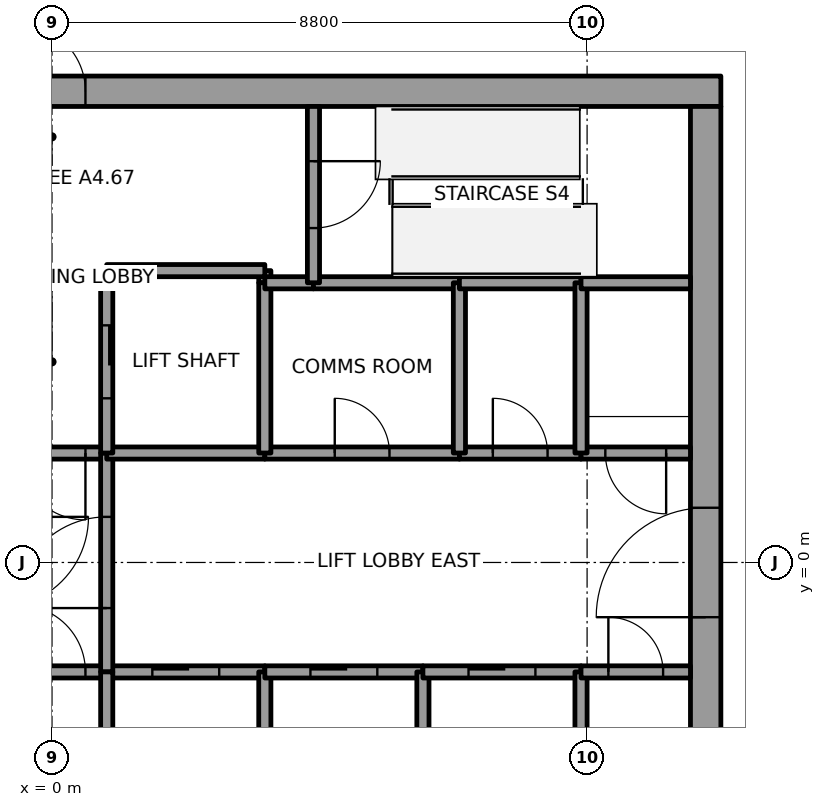
"""IFC4 building model, lengths in metres.
Left out: names, types, materials, properties, quantities, classifications, styles, units other than length and angle.
Written with IfcOpenShell. Run it as: python <this file> out.ifc"""

import sys

from ifc_helpers import new_model, si_unit, direction, frame, frame_2d, origin, place, context, subcontext, project, spatial, rectangle, extrude, element, fill, save


model = new_model("IFC4")
c1 = context("Model", 3, precision=1e-05, world=origin(), true_north=direction((0.0, 1.0)))
c2 = subcontext(c1, "Body", "Model", "MODEL_VIEW")
j1 = project(units=[si_unit("LENGTHUNIT", "METRE"), si_unit("PLANEANGLEUNIT", "RADIAN")], contexts=[c1])
p1 = place(None, origin())
s1 = spatial("IfcSite", under=j1, at=p1, CompositionType="ELEMENT")
p2 = place(p1, origin())
s2 = spatial("IfcBuilding", under=s1, at=p2, CompositionType="ELEMENT")
p3 = place(p2, frame((0.0, 0.0, 287.0)))
s3 = spatial("IfcBuildingStorey", under=s2, at=p3, CompositionType="ELEMENT", Elevation=287.0)
p4 = place(p3, frame((-11.0, 7.75, 0.0), z_axis=(0.0, 0.0, 1.0), x_axis=(1.0, 0.0, 0.0)))
e1 = element("IfcWall", 1, at=p4, inside=s3, PredefinedType="SHEAR", context=c2, shape_type="SweptSolid", body=[
    extrude(rectangle(XDim=22.0, YDim=0.5, at=frame_2d((11.0, 0.0))), origin(), (0.0, 0.0, 1.0), 4.0),
])
p5 = place(p4, frame((10.45, 0.0, 0.0)))
e2 = element("IfcOpeningElement", 2, at=p5, cuts=e1, PredefinedType="OPENING", context=c2, shape_type="SweptSolid", body=[
    extrude(rectangle(XDim=1.1, YDim=2.1, at=frame_2d((0.55, 1.05))), frame((0.0, 0.25, 0.0), z_axis=(0.0, -1.0, 0.0), x_axis=(1.0, 0.0, 0.0)), (0.0, 0.0, 1.0), 0.5),
])
p6 = place(p3, frame((10.75, -7.5, 0.0), z_axis=(0.0, 0.0, 1.0), x_axis=(0.0, 1.0, 0.0)))
e3 = element("IfcWall", 3, at=p6, inside=s3, PredefinedType="SHEAR", context=c2, shape_type="SweptSolid", body=[
    extrude(rectangle(XDim=15.0, YDim=0.5, at=frame_2d((7.5, 0.0))), origin(), (0.0, 0.0, 1.0), 4.0),
])
p7 = place(p6, frame((6.6, 0.0, 0.0)))
e4 = element("IfcOpeningElement", 4, at=p7, cuts=e3, PredefinedType="OPENING", context=c2, shape_type="SweptSolid", body=[
    extrude(rectangle(XDim=1.8, YDim=2.1, at=frame_2d((0.9, 1.05))), frame((0.0, 0.25, 0.0), z_axis=(0.0, -1.0, 0.0), x_axis=(1.0, 0.0, 0.0)), (0.0, 0.0, 1.0), 0.5),
])
p8 = place(p3, frame((-0.9, -1.8, 0.0), z_axis=(0.0, 0.0, 1.0), x_axis=(1.0, 0.0, 0.0)))
e5 = element("IfcWall", 5, at=p8, inside=s3, PredefinedType="SOLIDWALL", context=c2, shape_type="SweptSolid", body=[
    extrude(rectangle(XDim=1.8, YDim=0.2, at=frame_2d((0.9, 0.0))), origin(), (0.0, 0.0, 1.0), 3.85),
])
p9 = place(p8, frame((0.35, 0.0, 0.0)))
e6 = element("IfcOpeningElement", 6, at=p9, cuts=e5, PredefinedType="OPENING", context=c2, shape_type="SweptSolid", body=[
    extrude(rectangle(XDim=1.1, YDim=2.1, at=frame_2d((0.55, 1.05))), frame((0.0, 0.1, 0.0), z_axis=(0.0, -1.0, 0.0), x_axis=(1.0, 0.0, 0.0)), (0.0, 0.0, 1.0), 0.2),
])
p10 = place(p3, frame((0.9, 1.8, 0.0), z_axis=(0.0, 0.0, 1.0), x_axis=(-1.0, 0.0, 0.0)))
e7 = element("IfcWall", 7, at=p10, inside=s3, PredefinedType="SOLIDWALL", context=c2, shape_type="SweptSolid", body=[
    extrude(rectangle(XDim=1.8, YDim=0.2, at=frame_2d((0.9, 0.0))), origin(), (0.0, 0.0, 1.0), 3.85),
])
p11 = place(p10, frame((0.35, 0.0, 0.0)))
e8 = element("IfcOpeningElement", 8, at=p11, cuts=e7, PredefinedType="OPENING", context=c2, shape_type="SweptSolid", body=[
    extrude(rectangle(XDim=1.1, YDim=2.1, at=frame_2d((0.55, 1.05))), frame((0.0, 0.1, 0.0), z_axis=(0.0, -1.0, 0.0), x_axis=(1.0, 0.0, 0.0)), (0.0, 0.0, 1.0), 0.2),
])
p12 = place(p3, frame((0.9, -1.8, 0.0), z_axis=(0.0, 0.0, 1.0), x_axis=(1.0, 0.0, 0.0)))
e9 = element("IfcWall", 9, at=p12, inside=s3, PredefinedType="SOLIDWALL", context=c2, shape_type="SweptSolid", body=[
    extrude(rectangle(XDim=2.6, YDim=0.2, at=frame_2d((1.3, 0.0))), origin(), (0.0, 0.0, 1.0), 3.85),
])
p13 = place(p12, frame((0.75, 0.0, 0.0)))
e10 = element("IfcOpeningElement", 10, at=p13, cuts=e9, PredefinedType="OPENING", context=c2, shape_type="SweptSolid", body=[
    extrude(rectangle(XDim=1.1, YDim=2.1, at=frame_2d((0.55, 1.05))), frame((0.0, 0.1, 0.0), z_axis=(0.0, -1.0, 0.0), x_axis=(1.0, 0.0, 0.0)), (0.0, 0.0, 1.0), 0.2),
])
p14 = place(p3, frame((0.9, -1.8, 0.0), z_axis=(0.0, 0.0, 1.0), x_axis=(0.0, 1.0, 0.0)))
e11 = element("IfcWall", 11, at=p14, inside=s3, PredefinedType="SOLIDWALL", context=c2, shape_type="SweptSolid", body=[
    extrude(rectangle(XDim=3.6, YDim=0.2, at=frame_2d((1.8, 0.0))), origin(), (0.0, 0.0, 1.0), 3.85),
])
p15 = place(p14, frame((1.05, 0.0, 0.0)))
e12 = element("IfcOpeningElement", 12, at=p15, cuts=e11, PredefinedType="OPENING", context=c2, shape_type="SweptSolid", body=[
    extrude(rectangle(XDim=1.5, YDim=2.1, at=frame_2d((0.75, 1.05))), frame((0.0, 0.1, 0.0), z_axis=(0.0, -1.0, 0.0), x_axis=(1.0, 0.0, 0.0)), (0.0, 0.0, 1.0), 0.2),
])
p16 = place(p3, frame((0.9, -1.8, 0.0), z_axis=(0.0, 0.0, 1.0), x_axis=(0.0, -1.0, 0.0)))
e13 = element("IfcWall", 13, at=p16, inside=s3, PredefinedType="SOLIDWALL", context=c2, shape_type="SweptSolid", body=[
    extrude(rectangle(XDim=2.8, YDim=0.2, at=frame_2d((1.4, 0.0))), origin(), (0.0, 0.0, 1.0), 3.85),
])
p17 = place(p3, frame((3.5, 1.8, 0.0), z_axis=(0.0, 0.0, 1.0), x_axis=(-1.0, 0.0, 0.0)))
e14 = element("IfcWall", 14, at=p17, inside=s3, PredefinedType="SOLIDWALL", context=c2, shape_type="SweptSolid", body=[
    extrude(rectangle(XDim=2.6, YDim=0.2, at=frame_2d((1.3, 0.0))), origin(), (0.0, 0.0, 1.0), 3.85),
])
p18 = place(p3, frame((3.5, 4.6, 0.0), z_axis=(0.0, 0.0, 1.0), x_axis=(0.0, 1.0, 0.0)))
e15 = element("IfcWall", 15, at=p18, inside=s3, PredefinedType="SOLIDWALL", context=c2, shape_type="SweptSolid", body=[
    extrude(rectangle(XDim=0.2, YDim=0.2, at=frame_2d((0.1, 0.0))), origin(), (0.0, 0.0, 1.0), 3.85),
])
p19 = place(p3, frame((3.5, 4.8, 0.0), z_axis=(0.0, 0.0, 1.0), x_axis=(-1.0, 0.0, 0.0)))
e16 = element("IfcWall", 16, at=p19, inside=s3, PredefinedType="SOLIDWALL", context=c2, shape_type="SweptSolid", body=[
    extrude(rectangle(XDim=2.6, YDim=0.2, at=frame_2d((1.3, 0.0))), origin(), (0.0, 0.0, 1.0), 3.85),
])
p20 = place(p3, frame((0.9, 4.8, 0.0), z_axis=(0.0, 0.0, 1.0), x_axis=(0.0, -1.0, 0.0)))
e17 = element("IfcWall", 17, at=p20, inside=s3, PredefinedType="SOLIDWALL", context=c2, shape_type="SweptSolid", body=[
    extrude(rectangle(XDim=3.0, YDim=0.2, at=frame_2d((1.5, 0.0))), origin(), (0.0, 0.0, 1.0), 3.85),
])
p21 = place(p20, frame((0.9, 0.0, 0.0)))
e18 = element("IfcOpeningElement", 18, at=p21, cuts=e17, PredefinedType="OPENING", context=c2, shape_type="SweptSolid", body=[
    extrude(rectangle(XDim=1.2, YDim=2.1, at=frame_2d((0.6, 1.05))), frame((0.0, 0.1, 0.0), z_axis=(0.0, -1.0, 0.0), x_axis=(1.0, 0.0, 0.0)), (0.0, 0.0, 1.0), 0.2),
])
p22 = place(p3, frame((3.5, -4.6, 0.0), z_axis=(0.0, 0.0, 1.0), x_axis=(0.0, 1.0, 0.0)))
e19 = element("IfcWall", 19, at=p22, inside=s3, PredefinedType="SOLIDWALL", context=c2, shape_type="SweptSolid", body=[
    extrude(rectangle(XDim=2.8, YDim=0.2, at=frame_2d((1.4, 0.0))), origin(), (0.0, 0.0, 1.0), 3.85),
])
p23 = place(p3, frame((3.5, -1.8, 0.0), z_axis=(0.0, 0.0, 1.0), x_axis=(1.0, 0.0, 0.0)))
e20 = element("IfcWall", 20, at=p23, inside=s3, PredefinedType="SOLIDWALL", context=c2, shape_type="SweptSolid", body=[
    extrude(rectangle(XDim=2.6, YDim=0.2, at=frame_2d((1.3, 0.0))), origin(), (0.0, 0.0, 1.0), 3.85),
])
p24 = place(p23, frame((0.75, 0.0, 0.0)))
e21 = element("IfcOpeningElement", 21, at=p24, cuts=e20, PredefinedType="OPENING", context=c2, shape_type="SweptSolid", body=[
    extrude(rectangle(XDim=1.1, YDim=2.1, at=frame_2d((0.55, 1.05))), frame((0.0, 0.1, 0.0), z_axis=(0.0, -1.0, 0.0), x_axis=(1.0, 0.0, 0.0)), (0.0, 0.0, 1.0), 0.2),
])
p25 = place(p3, frame((3.5, 1.8, 0.0), z_axis=(0.0, 0.0, 1.0), x_axis=(1.0, 0.0, 0.0)))
e22 = element("IfcWall", 22, at=p25, inside=s3, PredefinedType="SOLIDWALL", context=c2, shape_type="SweptSolid", body=[
    extrude(rectangle(XDim=3.2, YDim=0.2, at=frame_2d((1.6, 0.0))), origin(), (0.0, 0.0, 1.0), 3.85),
])
p26 = place(p25, frame((1.15, 0.0, 0.0)))
e23 = element("IfcOpeningElement", 23, at=p26, cuts=e22, PredefinedType="OPENING", context=c2, shape_type="SweptSolid", body=[
    extrude(rectangle(XDim=0.9, YDim=2.1, at=frame_2d((0.45, 1.05))), frame((0.0, 0.1, 0.0), z_axis=(0.0, -1.0, 0.0), x_axis=(1.0, 0.0, 0.0)), (0.0, 0.0, 1.0), 0.2),
])
p27 = place(p3, frame((3.5, 4.6, 0.0), z_axis=(0.0, 0.0, 1.0), x_axis=(0.0, -1.0, 0.0)))
e24 = element("IfcWall", 24, at=p27, inside=s3, PredefinedType="SOLIDWALL", context=c2, shape_type="SweptSolid", body=[
    extrude(rectangle(XDim=2.8, YDim=0.2, at=frame_2d((1.4, 0.0))), origin(), (0.0, 0.0, 1.0), 3.85),
])
p28 = place(p3, frame((4.3, 4.6, 0.0), z_axis=(0.0, 0.0, 1.0), x_axis=(-1.0, 0.0, 0.0)))
e25 = element("IfcWall", 25, at=p28, inside=s3, PredefinedType="SOLIDWALL", context=c2, shape_type="SweptSolid", body=[
    extrude(rectangle(XDim=0.8, YDim=0.2, at=frame_2d((0.4, 0.0))), origin(), (0.0, 0.0, 1.0), 3.85),
])
p29 = place(p3, frame((6.7, 4.6, 0.0), z_axis=(0.0, 0.0, 1.0), x_axis=(-1.0, 0.0, 0.0)))
e26 = element("IfcWall", 26, at=p29, inside=s3, PredefinedType="SOLIDWALL", context=c2, shape_type="SweptSolid", body=[
    extrude(rectangle(XDim=2.4, YDim=0.2, at=frame_2d((1.2, 0.0))), origin(), (0.0, 0.0, 1.0), 3.85),
])
p30 = place(p3, frame((4.3, 7.5, 0.0), z_axis=(0.0, 0.0, 1.0), x_axis=(0.0, -1.0, 0.0)))
e27 = element("IfcWall", 27, at=p30, inside=s3, PredefinedType="SOLIDWALL", context=c2, shape_type="SweptSolid", body=[
    extrude(rectangle(XDim=2.9, YDim=0.2, at=frame_2d((1.45, 0.0))), origin(), (0.0, 0.0, 1.0), 3.85),
])
p31 = place(p30, frame((0.9, 0.0, 0.0)))
e28 = element("IfcOpeningElement", 28, at=p31, cuts=e27, PredefinedType="OPENING", context=c2, shape_type="SweptSolid", body=[
    extrude(rectangle(XDim=1.1, YDim=2.1, at=frame_2d((0.55, 1.05))), frame((0.0, 0.1, 0.0), z_axis=(0.0, -1.0, 0.0), x_axis=(1.0, 0.0, 0.0)), (0.0, 0.0, 1.0), 0.2),
])
p32 = place(p3, frame((6.1, -4.6, 0.0), z_axis=(0.0, 0.0, 1.0), x_axis=(0.0, 1.0, 0.0)))
e29 = element("IfcWall", 29, at=p32, inside=s3, PredefinedType="SOLIDWALL", context=c2, shape_type="SweptSolid", body=[
    extrude(rectangle(XDim=2.8, YDim=0.2, at=frame_2d((1.4, 0.0))), origin(), (0.0, 0.0, 1.0), 3.85),
])
p33 = place(p3, frame((6.1, -1.8, 0.0), z_axis=(0.0, 0.0, 1.0), x_axis=(1.0, 0.0, 0.0)))
e30 = element("IfcWall", 30, at=p33, inside=s3, PredefinedType="SOLIDWALL", context=c2, shape_type="SweptSolid", body=[
    extrude(rectangle(XDim=2.6, YDim=0.2, at=frame_2d((1.3, 0.0))), origin(), (0.0, 0.0, 1.0), 3.85),
])
p34 = place(p33, frame((0.75, 0.0, 0.0)))
e31 = element("IfcOpeningElement", 31, at=p34, cuts=e30, PredefinedType="OPENING", context=c2, shape_type="SweptSolid", body=[
    extrude(rectangle(XDim=1.1, YDim=2.1, at=frame_2d((0.55, 1.05))), frame((0.0, 0.1, 0.0), z_axis=(0.0, -1.0, 0.0), x_axis=(1.0, 0.0, 0.0)), (0.0, 0.0, 1.0), 0.2),
])
p35 = place(p3, frame((6.7, 1.8, 0.0), z_axis=(0.0, 0.0, 1.0), x_axis=(1.0, 0.0, 0.0)))
e32 = element("IfcWall", 32, at=p35, inside=s3, PredefinedType="SOLIDWALL", context=c2, shape_type="SweptSolid", body=[
    extrude(rectangle(XDim=2.0, YDim=0.2, at=frame_2d((1.0, 0.0))), origin(), (0.0, 0.0, 1.0), 3.85),
])
p36 = place(p35, frame((0.55, 0.0, 0.0)))
e33 = element("IfcOpeningElement", 33, at=p36, cuts=e32, PredefinedType="OPENING", context=c2, shape_type="SweptSolid", body=[
    extrude(rectangle(XDim=0.9, YDim=2.1, at=frame_2d((0.45, 1.05))), frame((0.0, 0.1, 0.0), z_axis=(0.0, -1.0, 0.0), x_axis=(1.0, 0.0, 0.0)), (0.0, 0.0, 1.0), 0.2),
])
p37 = place(p3, frame((6.7, 1.8, 0.0), z_axis=(0.0, 0.0, 1.0), x_axis=(0.0, 1.0, 0.0)))
e34 = element("IfcWall", 34, at=p37, inside=s3, PredefinedType="SOLIDWALL", context=c2, shape_type="SweptSolid", body=[
    extrude(rectangle(XDim=2.8, YDim=0.2, at=frame_2d((1.4, 0.0))), origin(), (0.0, 0.0, 1.0), 3.85),
])
p38 = place(p3, frame((8.7, 4.6, 0.0), z_axis=(0.0, 0.0, 1.0), x_axis=(-1.0, 0.0, 0.0)))
e35 = element("IfcWall", 35, at=p38, inside=s3, PredefinedType="SOLIDWALL", context=c2, shape_type="SweptSolid", body=[
    extrude(rectangle(XDim=2.0, YDim=0.2, at=frame_2d((1.0, 0.0))), origin(), (0.0, 0.0, 1.0), 3.85),
])
p39 = place(p3, frame((8.7, -1.8, 0.0), z_axis=(0.0, 0.0, 1.0), x_axis=(0.0, -1.0, 0.0)))
e36 = element("IfcWall", 36, at=p39, inside=s3, PredefinedType="SOLIDWALL", context=c2, shape_type="SweptSolid", body=[
    extrude(rectangle(XDim=2.8, YDim=0.2, at=frame_2d((1.4, 0.0))), origin(), (0.0, 0.0, 1.0), 3.85),
])
p40 = place(p3, frame((8.7, -1.8, 0.0), z_axis=(0.0, 0.0, 1.0), x_axis=(1.0, 0.0, 0.0)))
e37 = element("IfcWall", 37, at=p40, inside=s3, PredefinedType="SOLIDWALL", context=c2, shape_type="SweptSolid", body=[
    extrude(rectangle(XDim=1.8, YDim=0.2, at=frame_2d((0.9, 0.0))), origin(), (0.0, 0.0, 1.0), 3.85),
])
p41 = place(p40, frame((0.45, 0.0, 0.0)))
e38 = element("IfcOpeningElement", 38, at=p41, cuts=e37, PredefinedType="OPENING", context=c2, shape_type="SweptSolid", body=[
    extrude(rectangle(XDim=0.9, YDim=2.1, at=frame_2d((0.45, 1.05))), frame((0.0, 0.1, 0.0), z_axis=(0.0, -1.0, 0.0), x_axis=(1.0, 0.0, 0.0)), (0.0, 0.0, 1.0), 0.2),
])
p42 = place(p3, frame((10.5, 1.8, 0.0), z_axis=(0.0, 0.0, 1.0), x_axis=(-1.0, 0.0, 0.0)))
e39 = element("IfcWall", 39, at=p42, inside=s3, PredefinedType="SOLIDWALL", context=c2, shape_type="SweptSolid", body=[
    extrude(rectangle(XDim=1.8, YDim=0.2, at=frame_2d((0.9, 0.0))), origin(), (0.0, 0.0, 1.0), 3.85),
])
p43 = place(p42, frame((0.4, 0.0, 0.0)))
e40 = element("IfcOpeningElement", 40, at=p43, cuts=e39, PredefinedType="OPENING", context=c2, shape_type="SweptSolid", body=[
    extrude(rectangle(XDim=1.0, YDim=2.1, at=frame_2d((0.5, 1.05))), frame((0.0, 0.1, 0.0), z_axis=(0.0, -1.0, 0.0), x_axis=(1.0, 0.0, 0.0)), (0.0, 0.0, 1.0), 0.2),
])
p44 = place(p3, frame((8.7, 1.8, 0.0), z_axis=(0.0, 0.0, 1.0), x_axis=(0.0, 1.0, 0.0)))
e41 = element("IfcWall", 41, at=p44, inside=s3, PredefinedType="SOLIDWALL", context=c2, shape_type="SweptSolid", body=[
    extrude(rectangle(XDim=2.8, YDim=0.2, at=frame_2d((1.4, 0.0))), origin(), (0.0, 0.0, 1.0), 3.85),
])
p45 = place(p3, frame((10.5, 4.6, 0.0), z_axis=(0.0, 0.0, 1.0), x_axis=(-1.0, 0.0, 0.0)))
e42 = element("IfcWall", 42, at=p45, inside=s3, PredefinedType="SOLIDWALL", context=c2, shape_type="SweptSolid", body=[
    extrude(rectangle(XDim=1.8, YDim=0.2, at=frame_2d((0.9, 0.0))), origin(), (0.0, 0.0, 1.0), 3.85),
])
p46 = place(p13, origin())
e43 = element("IfcDoor", 43, at=p46, inside=s3, OperationType="SLIDING_TO_RIGHT", PredefinedType="DOOR", context=c2, shape_type="SweptSolid", body=[
    extrude(rectangle(XDim=1.1, YDim=2.1, at=frame_2d((0.55, 1.05))), frame((0.0, 0.025, 0.0), z_axis=(0.0, -1.0, 0.0), x_axis=(1.0, 0.0, 0.0)), (0.0, 0.0, 1.0), 0.05),
])
fill(e10, e43)
p47 = place(p24, origin())
e44 = element("IfcDoor", 44, at=p47, inside=s3, OperationType="SLIDING_TO_RIGHT", PredefinedType="DOOR", context=c2, shape_type="SweptSolid", body=[
    extrude(rectangle(XDim=1.1, YDim=2.1, at=frame_2d((0.55, 1.05))), frame((0.0, 0.025, 0.0), z_axis=(0.0, -1.0, 0.0), x_axis=(1.0, 0.0, 0.0)), (0.0, 0.0, 1.0), 0.05),
])
fill(e21, e44)
p48 = place(p34, origin())
e45 = element("IfcDoor", 45, at=p48, inside=s3, OperationType="SLIDING_TO_LEFT", PredefinedType="DOOR", context=c2, shape_type="SweptSolid", body=[
    extrude(rectangle(XDim=1.1, YDim=2.1, at=frame_2d((0.55, 1.05))), frame((0.0, 0.025, 0.0), z_axis=(0.0, -1.0, 0.0), x_axis=(1.0, 0.0, 0.0)), (0.0, 0.0, 1.0), 0.05),
])
fill(e31, e45)
p49 = place(p21, origin())
e46 = element("IfcDoor", 46, at=p49, inside=s3, OperationType="SLIDING_TO_LEFT", PredefinedType="DOOR", context=c2, shape_type="SweptSolid", body=[
    extrude(rectangle(XDim=1.2, YDim=2.1, at=frame_2d((0.6, 1.05))), frame((0.0, 0.025, 0.0), z_axis=(0.0, -1.0, 0.0), x_axis=(1.0, 0.0, 0.0)), (0.0, 0.0, 1.0), 0.05),
])
fill(e18, e46)
p50 = place(p15, origin())
e47 = element("IfcDoor", 47, at=p50, inside=s3, OperationType="DOUBLE_DOOR_SINGLE_SWING", PredefinedType="DOOR", context=c2, shape_type="SweptSolid", body=[
    extrude(rectangle(XDim=1.5, YDim=2.1, at=frame_2d((0.75, 1.05))), frame((0.0, 0.025, 0.0), z_axis=(0.0, -1.0, 0.0), x_axis=(1.0, 0.0, 0.0)), (0.0, 0.0, 1.0), 0.05),
])
fill(e12, e47)
p51 = place(p11, origin())
e48 = element("IfcDoor", 48, at=p51, inside=s3, OperationType="SINGLE_SWING_LEFT", PredefinedType="DOOR", context=c2, shape_type="SweptSolid", body=[
    extrude(rectangle(XDim=1.1, YDim=2.1, at=frame_2d((0.55, 1.05))), frame((0.0, 0.025, 0.0), z_axis=(0.0, -1.0, 0.0), x_axis=(1.0, 0.0, 0.0)), (0.0, 0.0, 1.0), 0.05),
])
fill(e8, e48)
p52 = place(p9, origin())
e49 = element("IfcDoor", 49, at=p52, inside=s3, OperationType="SINGLE_SWING_RIGHT", PredefinedType="DOOR", context=c2, shape_type="SweptSolid", body=[
    extrude(rectangle(XDim=1.1, YDim=2.1, at=frame_2d((0.55, 1.05))), frame((0.0, 0.025, 0.0), z_axis=(0.0, -1.0, 0.0), x_axis=(1.0, 0.0, 0.0)), (0.0, 0.0, 1.0), 0.05),
])
fill(e6, e49)
p53 = place(p43, origin())
e50 = element("IfcDoor", 50, at=p53, inside=s3, OperationType="SINGLE_SWING_RIGHT", PredefinedType="DOOR", context=c2, shape_type="SweptSolid", body=[
    extrude(rectangle(XDim=1.0, YDim=2.1, at=frame_2d((0.5, 1.05))), frame((0.0, 0.025, 0.0), z_axis=(0.0, -1.0, 0.0), x_axis=(1.0, 0.0, 0.0)), (0.0, 0.0, 1.0), 0.05),
])
fill(e40, e50)
p54 = place(p31, origin())
e51 = element("IfcDoor", 51, at=p54, inside=s3, OperationType="SINGLE_SWING_RIGHT", PredefinedType="DOOR", context=c2, shape_type="SweptSolid", body=[
    extrude(rectangle(XDim=1.1, YDim=2.1, at=frame_2d((0.55, 1.05))), frame((0.0, 0.025, 0.0), z_axis=(0.0, -1.0, 0.0), x_axis=(1.0, 0.0, 0.0)), (0.0, 0.0, 1.0), 0.05),
])
fill(e28, e51)
p55 = place(p26, origin())
e52 = element("IfcDoor", 52, at=p55, inside=s3, OperationType="SINGLE_SWING_LEFT", PredefinedType="DOOR", context=c2, shape_type="SweptSolid", body=[
    extrude(rectangle(XDim=0.9, YDim=2.1, at=frame_2d((0.45, 1.05))), frame((0.0, 0.025, 0.0), z_axis=(0.0, -1.0, 0.0), x_axis=(1.0, 0.0, 0.0)), (0.0, 0.0, 1.0), 0.05),
])
fill(e23, e52)
p56 = place(p36, origin())
e53 = element("IfcDoor", 53, at=p56, inside=s3, OperationType="SINGLE_SWING_LEFT", PredefinedType="DOOR", context=c2, shape_type="SweptSolid", body=[
    extrude(rectangle(XDim=0.9, YDim=2.1, at=frame_2d((0.45, 1.05))), frame((0.0, 0.025, 0.0), z_axis=(0.0, -1.0, 0.0), x_axis=(1.0, 0.0, 0.0)), (0.0, 0.0, 1.0), 0.05),
])
fill(e33, e53)
p57 = place(p41, origin())
e54 = element("IfcDoor", 54, at=p57, inside=s3, OperationType="SINGLE_SWING_LEFT", PredefinedType="DOOR", context=c2, shape_type="SweptSolid", body=[
    extrude(rectangle(XDim=0.9, YDim=2.1, at=frame_2d((0.45, 1.05))), frame((0.0, 0.025, 0.0), z_axis=(0.0, -1.0, 0.0), x_axis=(1.0, 0.0, 0.0)), (0.0, 0.0, 1.0), 0.05),
])
fill(e38, e54)
p58 = place(p7, origin())
e55 = element("IfcDoor", 55, at=p58, inside=s3, OperationType="DOUBLE_DOOR_SINGLE_SWING", PredefinedType="DOOR", context=c2, shape_type="SweptSolid", body=[
    extrude(rectangle(XDim=1.8, YDim=2.1, at=frame_2d((0.9, 1.05))), frame((0.0, 0.025, 0.0), z_axis=(0.0, -1.0, 0.0), x_axis=(1.0, 0.0, 0.0)), (0.0, 0.0, 1.0), 0.05),
])
fill(e4, e55)
p59 = place(p5, origin())
e56 = element("IfcDoor", 56, at=p59, inside=s3, OperationType="SINGLE_SWING_RIGHT", PredefinedType="DOOR", context=c2, shape_type="SweptSolid", body=[
    extrude(rectangle(XDim=1.1, YDim=2.1, at=frame_2d((0.55, 1.05))), frame((0.0, 0.025, 0.0), z_axis=(0.0, -1.0, 0.0), x_axis=(1.0, 0.0, 0.0)), (0.0, 0.0, 1.0), 0.05),
])
fill(e2, e56)
save(model, sys.argv[1])
